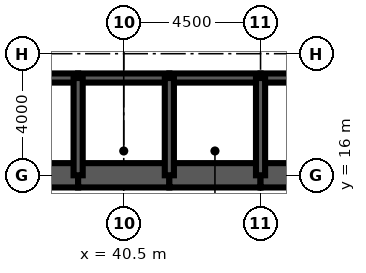
"""IFC4 building model, lengths in metres.
Left out: names, types, materials, properties, quantities, classifications, styles, units other than length and angle.
Written with IfcOpenShell. Run it as: python <this file> out.ifc"""

import sys

from ifc_helpers import new_model, si_unit, direction, frame, frame_2d, origin, place, context, subcontext, project, spatial, rectangle, extrude, element, fill, save


model = new_model("IFC4")
c1 = context("Model", 3, precision=1e-05, world=origin(), true_north=direction((0.0, 1.0)))
c2 = subcontext(c1, "Body", "Model", "MODEL_VIEW")
j1 = project(units=[si_unit("LENGTHUNIT", "METRE"), si_unit("PLANEANGLEUNIT", "RADIAN")], contexts=[c1])
p1 = place(None, origin())
s1 = spatial("IfcSite", under=j1, at=p1, CompositionType="ELEMENT")
p2 = place(p1, origin())
s2 = spatial("IfcBuilding", under=s1, at=p2, CompositionType="ELEMENT")
p3 = place(p2, frame((0.0, 0.0, 206.8)))
s3 = spatial("IfcBuildingStorey", under=s2, at=p3, CompositionType="ELEMENT", Elevation=206.8)
for number, where, z_axis, x_axis in (
    (1, (36.0, 16.0, 0.0), (0.0, 0.0, 1.0), (1.0, 0.0, 0.0)),
    (2, (39.0, 16.0, 0.0), (0.0, 0.0, 1.0), (1.0, 0.0, 0.0)),
    (3, (42.0, 16.0, 0.0), (0.0, 0.0, 1.0), (1.0, 0.0, 0.0)),
):
    element("IfcWall", number, at=place(p3, frame(where, z_axis=z_axis, x_axis=x_axis)), inside=s3, PredefinedType="SHEAR", context=c2, shape_type="SweptSolid", body=[
        extrude(rectangle(XDim=3.0, YDim=0.8, at=frame_2d((1.5, 0.0))), origin(), (0.0, 0.0, 1.0), 4.2),
    ])
p4 = place(p3, frame((45.0, 16.0, 0.0), z_axis=(0.0, 0.0, 1.0), x_axis=(1.0, 0.0, 0.0)))
e4 = element("IfcWall", 4, at=p4, inside=s3, PredefinedType="SHEAR", context=c2, shape_type="SweptSolid", body=[
    extrude(rectangle(XDim=9.4, YDim=0.8, at=frame_2d((4.7, 0.0))), origin(), (0.0, 0.0, 1.0), 4.2),
])
p5 = place(p3, frame((36.0, 19.2, 0.0), z_axis=(0.0, 0.0, 1.0), x_axis=(1.0, 0.0, 0.0)))
e5 = element("IfcWall", 5, at=p5, inside=s3, PredefinedType="SOLIDWALL", context=c2, shape_type="SweptSolid", body=[
    extrude(rectangle(XDim=3.0, YDim=0.3, at=frame_2d((1.5, 0.0))), origin(), (0.0, 0.0, 1.0), 4.2),
])
p6 = place(p5, frame((0.95, 0.0, 0.0)))
e6 = element("IfcOpeningElement", 6, at=p6, cuts=e5, PredefinedType="OPENING", context=c2, shape_type="SweptSolid", body=[
    extrude(rectangle(XDim=1.1, YDim=2.2, at=frame_2d((0.55, 1.1))), frame((0.0, 0.16, 0.0), z_axis=(0.0, -1.0, 0.0), x_axis=(1.0, 0.0, 0.0)), (0.0, 0.0, 1.0), 0.32),
])
p7 = place(p3, frame((39.0, 19.2, 0.0), z_axis=(0.0, 0.0, 1.0), x_axis=(1.0, 0.0, 0.0)))
e7 = element("IfcWall", 7, at=p7, inside=s3, PredefinedType="SOLIDWALL", context=c2, shape_type="SweptSolid", body=[
    extrude(rectangle(XDim=3.0, YDim=0.3, at=frame_2d((1.5, 0.0))), origin(), (0.0, 0.0, 1.0), 4.2),
])
p8 = place(p7, frame((1.0, 0.0, 0.0)))
e8 = element("IfcOpeningElement", 8, at=p8, cuts=e7, PredefinedType="OPENING", context=c2, shape_type="SweptSolid", body=[
    extrude(rectangle(XDim=1.0, YDim=2.1, at=frame_2d((0.5, 1.05))), frame((0.0, 0.16, 0.0), z_axis=(0.0, -1.0, 0.0), x_axis=(1.0, 0.0, 0.0)), (0.0, 0.0, 1.0), 0.32),
])
p9 = place(p3, frame((42.0, 19.2, 0.0), z_axis=(0.0, 0.0, 1.0), x_axis=(1.0, 0.0, 0.0)))
e9 = element("IfcWall", 9, at=p9, inside=s3, PredefinedType="SOLIDWALL", context=c2, shape_type="SweptSolid", body=[
    extrude(rectangle(XDim=3.0, YDim=0.3, at=frame_2d((1.5, 0.0))), origin(), (0.0, 0.0, 1.0), 4.2),
])
p10 = place(p9, frame((1.0, 0.0, 0.0)))
e10 = element("IfcOpeningElement", 10, at=p10, cuts=e9, PredefinedType="OPENING", context=c2, shape_type="SweptSolid", body=[
    extrude(rectangle(XDim=1.0, YDim=2.1, at=frame_2d((0.5, 1.05))), frame((0.0, 0.16, 0.0), z_axis=(0.0, -1.0, 0.0), x_axis=(1.0, 0.0, 0.0)), (0.0, 0.0, 1.0), 0.32),
])
p11 = place(p3, frame((45.0, 19.2, 0.0), z_axis=(0.0, 0.0, 1.0), x_axis=(1.0, 0.0, 0.0)))
e11 = element("IfcWall", 11, at=p11, inside=s3, PredefinedType="SOLIDWALL", context=c2, shape_type="SweptSolid", body=[
    extrude(rectangle(XDim=9.0, YDim=0.3, at=frame_2d((4.5, 0.0))), origin(), (0.0, 0.0, 1.0), 4.2),
])
p12 = place(p11, frame((7.35, 0.0, 0.0)))
e12 = element("IfcOpeningElement", 12, at=p12, cuts=e11, PredefinedType="OPENING", context=c2, shape_type="SweptSolid", body=[
    extrude(rectangle(XDim=1.0, YDim=2.1, at=frame_2d((0.5, 1.05))), frame((0.0, 0.16, 0.0), z_axis=(0.0, -1.0, 0.0), x_axis=(1.0, 0.0, 0.0)), (0.0, 0.0, 1.0), 0.32),
])
for number, where, z_axis, x_axis in (
    (13, (39.0, 16.0, 0.0), (0.0, 0.0, 1.0), (0.0, 1.0, 0.0)),
    (14, (42.0, 16.0, 0.0), (0.0, 0.0, 1.0), (0.0, 1.0, 0.0)),
    (15, (45.0, 16.0, 0.0), (0.0, 0.0, 1.0), (0.0, 1.0, 0.0)),
):
    element("IfcWall", number, at=place(p3, frame(where, z_axis=z_axis, x_axis=x_axis)), inside=s3, PredefinedType="SOLIDWALL", context=c2, shape_type="SweptSolid", body=[
        extrude(rectangle(XDim=3.2, YDim=0.3, at=frame_2d((1.6, 0.0))), origin(), (0.0, 0.0, 1.0), 4.2),
    ])
p13 = place(p3, frame((39.15, 17.35, 0.0), z_axis=(0.0, 0.0, 1.0), x_axis=(1.0, 0.0, 0.0)))
e16 = element("IfcWall", 16, at=p13, inside=s3, PredefinedType="SOLIDWALL", context=c2, shape_type="SweptSolid", body=[
    extrude(rectangle(XDim=2.7, YDim=0.3, at=frame_2d((1.35, 0.0))), origin(), (0.0, 0.0, 1.0), 4.04),
])
p14 = place(p13, frame((0.85, 0.0, 0.0)))
e17 = element("IfcOpeningElement", 17, at=p14, cuts=e16, PredefinedType="OPENING", context=c2, shape_type="SweptSolid", body=[
    extrude(rectangle(XDim=1.0, YDim=2.1, at=frame_2d((0.5, 1.05))), frame((0.0, 0.16, 0.0), z_axis=(0.0, -1.0, 0.0), x_axis=(1.0, 0.0, 0.0)), (0.0, 0.0, 1.0), 0.32),
])
p15 = place(p3, frame((42.15, 17.35, 0.0), z_axis=(0.0, 0.0, 1.0), x_axis=(1.0, 0.0, 0.0)))
e18 = element("IfcWall", 18, at=p15, inside=s3, PredefinedType="SOLIDWALL", context=c2, shape_type="SweptSolid", body=[
    extrude(rectangle(XDim=2.7, YDim=0.3, at=frame_2d((1.35, 0.0))), origin(), (0.0, 0.0, 1.0), 4.04),
])
p16 = place(p15, frame((0.85, 0.0, 0.0)))
e19 = element("IfcOpeningElement", 19, at=p16, cuts=e18, PredefinedType="OPENING", context=c2, shape_type="SweptSolid", body=[
    extrude(rectangle(XDim=1.0, YDim=2.1, at=frame_2d((0.5, 1.05))), frame((0.0, 0.16, 0.0), z_axis=(0.0, -1.0, 0.0), x_axis=(1.0, 0.0, 0.0)), (0.0, 0.0, 1.0), 0.32),
])
p17 = place(p14, origin())
e20 = element("IfcDoor", 20, at=p17, inside=s3, OperationType="SINGLE_SWING_LEFT", PredefinedType="DOOR", context=c2, shape_type="SweptSolid", body=[
    extrude(rectangle(XDim=1.0, YDim=2.1, at=frame_2d((0.5, 1.05))), frame((0.0, 0.025, 0.0), z_axis=(0.0, -1.0, 0.0), x_axis=(1.0, 0.0, 0.0)), (0.0, 0.0, 1.0), 0.05),
])
fill(e17, e20)
p18 = place(p16, origin())
e21 = element("IfcDoor", 21, at=p18, inside=s3, OperationType="SINGLE_SWING_LEFT", PredefinedType="DOOR", context=c2, shape_type="SweptSolid", body=[
    extrude(rectangle(XDim=1.0, YDim=2.1, at=frame_2d((0.5, 1.05))), frame((0.0, 0.025, 0.0), z_axis=(0.0, -1.0, 0.0), x_axis=(1.0, 0.0, 0.0)), (0.0, 0.0, 1.0), 0.05),
])
fill(e19, e21)
p19 = place(p8, origin())
e22 = element("IfcDoor", 22, at=p19, inside=s3, OperationType="SINGLE_SWING_LEFT", PredefinedType="DOOR", context=c2, shape_type="SweptSolid", body=[
    extrude(rectangle(XDim=1.0, YDim=2.1, at=frame_2d((0.5, 1.05))), frame((0.0, 0.025, 0.0), z_axis=(0.0, -1.0, 0.0), x_axis=(1.0, 0.0, 0.0)), (0.0, 0.0, 1.0), 0.05),
])
fill(e8, e22)
p20 = place(p10, origin())
e23 = element("IfcDoor", 23, at=p20, inside=s3, OperationType="SINGLE_SWING_LEFT", PredefinedType="DOOR", context=c2, shape_type="SweptSolid", body=[
    extrude(rectangle(XDim=1.0, YDim=2.1, at=frame_2d((0.5, 1.05))), frame((0.0, 0.025, 0.0), z_axis=(0.0, -1.0, 0.0), x_axis=(1.0, 0.0, 0.0)), (0.0, 0.0, 1.0), 0.05),
])
fill(e10, e23)
save(model, sys.argv[1])
